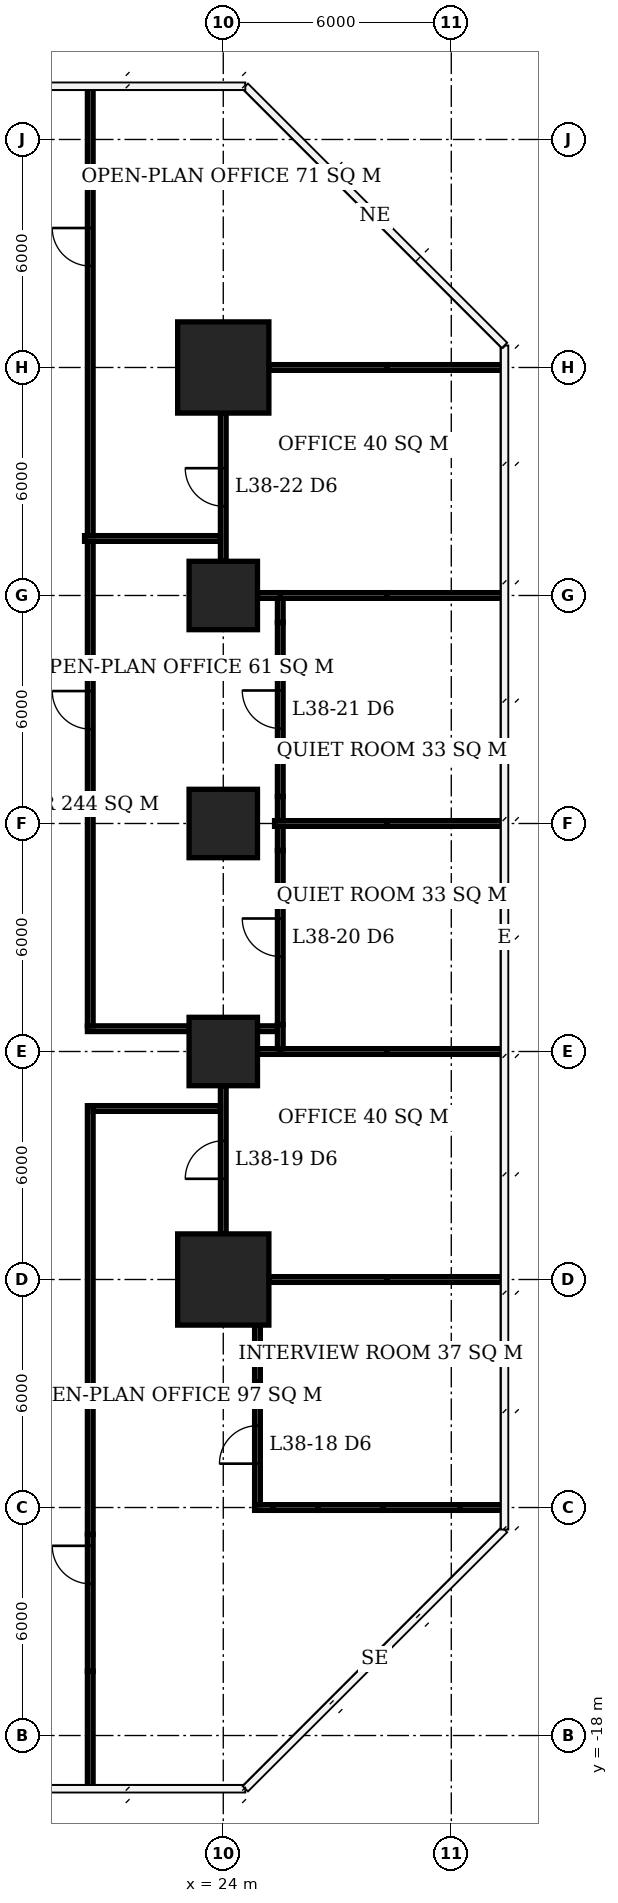
"""IFC4 building model, lengths in metres.
Left out: names, types, materials, properties, quantities, classifications, styles, units other than length and angle.
Written with IfcOpenShell. Run it as: python <this file> out.ifc"""

import sys

from ifc_helpers import new_model, si_unit, direction, frame, frame_2d, origin, origin_2d, place, context, subcontext, project, spatial, rectangle, extrude, element, fill, save


model = new_model("IFC4")
c1 = context("Model", 3, precision=1e-05, world=origin(), true_north=direction((0.0, 1.0)))
c2 = subcontext(c1, "Body", "Model", "MODEL_VIEW")
j1 = project(units=[si_unit("LENGTHUNIT", "METRE"), si_unit("PLANEANGLEUNIT", "RADIAN")], contexts=[c1])
p1 = place(None, origin())
s1 = spatial("IfcSite", under=j1, at=p1, CompositionType="ELEMENT")
p2 = place(p1, origin())
s2 = spatial("IfcBuilding", under=s1, at=p2, CompositionType="ELEMENT")
p3 = place(p2, frame((0.0, 0.0, 156.2)))
s3 = spatial("IfcBuildingStorey", under=s2, at=p3, CompositionType="ELEMENT", Elevation=156.2)
p4 = place(p3, frame((24.0, -6.0, 0.0), z_axis=(0.0, 0.0, 1.0), x_axis=(1.0, 0.0, 0.0)))
e1 = element("IfcColumn", 1, at=p4, inside=s3, PredefinedType="COLUMN", context=c2, shape_type="SweptSolid", body=[
    extrude(rectangle(XDim=2.4, YDim=2.4, at=origin_2d()), origin(), (0.0, 0.0, 1.0), 3.9),
])
for number, where, z_axis, x_axis in (
    (2, (24.0, 0.0, 0.0), (0.0, 0.0, 1.0), (1.0, 0.0, 0.0)),
    (3, (24.0, 6.0, 0.0), (0.0, 0.0, 1.0), (1.0, 0.0, 0.0)),
    (4, (24.0, 12.0, 0.0), (0.0, 0.0, 1.0), (1.0, 0.0, 0.0)),
):
    element("IfcColumn", number, at=place(p3, frame(where, z_axis=z_axis, x_axis=x_axis)), inside=s3, PredefinedType="COLUMN", context=c2, shape_type="SweptSolid", body=[
        extrude(rectangle(XDim=1.8, YDim=1.8, at=origin_2d()), origin(), (0.0, 0.0, 1.0), 3.9),
    ])
p5 = place(p3, frame((24.0, 18.0, 0.0), z_axis=(0.0, 0.0, 1.0), x_axis=(1.0, 0.0, 0.0)))
e5 = element("IfcColumn", 5, at=p5, inside=s3, PredefinedType="COLUMN", context=c2, shape_type="SweptSolid", body=[
    extrude(rectangle(XDim=2.4, YDim=2.4, at=origin_2d()), origin(), (0.0, 0.0, 1.0), 3.9),
])
p6 = place(p3, frame((24.825, -12.0, 0.0), z_axis=(0.0, 0.0, 1.0), x_axis=(1.0, 0.0, 0.0)))
e6 = element("IfcWall", 6, at=p6, inside=s3, PredefinedType="PARTITIONING", context=c2, shape_type="SweptSolid", body=[
    extrude(rectangle(XDim=0.485, YDim=0.15, at=frame_2d((0.243, 0.0))), origin(), (0.0, 0.0, 1.0), 3.65),
])
p7 = place(p3, frame((25.31, -12.0, 0.0), z_axis=(0.0, 0.0, 1.0), x_axis=(1.0, 0.0, 0.0)))
e7 = element("IfcWall", 7, at=p7, inside=s3, PredefinedType="PARTITIONING", context=c2, shape_type="SweptSolid", body=[
    extrude(rectangle(XDim=1.18, YDim=0.15, at=frame_2d((0.59, 0.0))), origin(), (0.0, 0.0, 1.0), 2.65),
])
p8 = place(p3, frame((26.49, -12.0, 0.0), z_axis=(0.0, 0.0, 1.0), x_axis=(1.0, 0.0, 0.0)))
e8 = element("IfcWall", 8, at=p8, inside=s3, PredefinedType="PARTITIONING", context=c2, shape_type="SweptSolid", body=[
    extrude(rectangle(XDim=1.718, YDim=0.15, at=frame_2d((0.859, 0.0))), origin(), (0.0, 0.0, 1.0), 3.65),
])
p9 = place(p3, frame((28.208, -12.0, 0.0), z_axis=(0.0, 0.0, 1.0), x_axis=(1.0, 0.0, 0.0)))
e9 = element("IfcWall", 9, at=p9, inside=s3, PredefinedType="PARTITIONING", context=c2, shape_type="SweptSolid", body=[
    extrude(rectangle(XDim=2.029, YDim=0.15, at=frame_2d((1.015, 0.0))), origin(), (0.0, 0.0, 1.0), 2.65),
])
p10 = place(p3, frame((30.237, -12.0, 0.0), z_axis=(0.0, 0.0, 1.0), x_axis=(1.0, 0.0, 0.0)))
e10 = element("IfcWall", 10, at=p10, inside=s3, PredefinedType="PARTITIONING", context=c2, shape_type="SweptSolid", body=[
    extrude(rectangle(XDim=1.163, YDim=0.15, at=frame_2d((0.582, 0.0))), origin(), (0.0, 0.0, 1.0), 3.65),
])
p11 = place(p3, frame((25.2, -6.0, 0.0), z_axis=(0.0, 0.0, 1.0), x_axis=(1.0, 0.0, 0.0)))
e11 = element("IfcWall", 11, at=p11, inside=s3, PredefinedType="PARTITIONING", context=c2, shape_type="SweptSolid", body=[
    extrude(rectangle(XDim=3.11, YDim=0.15, at=frame_2d((1.555, 0.0))), origin(), (0.0, 0.0, 1.0), 2.65),
])
p12 = place(p3, frame((28.31, -6.0, 0.0), z_axis=(0.0, 0.0, 1.0), x_axis=(1.0, 0.0, 0.0)))
e12 = element("IfcWall", 12, at=p12, inside=s3, PredefinedType="PARTITIONING", context=c2, shape_type="SweptSolid", body=[
    extrude(rectangle(XDim=3.09, YDim=0.15, at=frame_2d((1.545, 0.0))), origin(), (0.0, 0.0, 1.0), 3.65),
])
p13 = place(p3, frame((24.9, 0.0, 0.0), z_axis=(0.0, 0.0, 1.0), x_axis=(1.0, 0.0, 0.0)))
e13 = element("IfcWall", 13, at=p13, inside=s3, PredefinedType="PARTITIONING", context=c2, shape_type="SweptSolid", body=[
    extrude(rectangle(XDim=0.675, YDim=0.15, at=frame_2d((0.337, 0.0))), origin(), (0.0, 0.0, 1.0), 2.65),
])
p14 = place(p3, frame((25.5, 0.0, 0.0), z_axis=(0.0, 0.0, 1.0), x_axis=(1.0, 0.0, 0.0)))
e14 = element("IfcWall", 14, at=p14, inside=s3, PredefinedType="PARTITIONING", context=c2, shape_type="SweptSolid", body=[
    extrude(rectangle(XDim=2.81, YDim=0.15, at=frame_2d((1.405, 0.0))), origin(), (0.0, 0.0, 1.0), 2.65),
])
p15 = place(p3, frame((28.31, 0.0, 0.0), z_axis=(0.0, 0.0, 1.0), x_axis=(1.0, 0.0, 0.0)))
e15 = element("IfcWall", 15, at=p15, inside=s3, PredefinedType="PARTITIONING", context=c2, shape_type="SweptSolid", body=[
    extrude(rectangle(XDim=3.04, YDim=0.15, at=frame_2d((1.52, 0.0))), origin(), (0.0, 0.0, 1.0), 3.65),
])
p16 = place(p3, frame((25.35, 6.0, 0.0), z_axis=(0.0, 0.0, 1.0), x_axis=(1.0, 0.0, 0.0)))
e16 = element("IfcWall", 16, at=p16, inside=s3, PredefinedType="PARTITIONING", context=c2, shape_type="SweptSolid", body=[
    extrude(rectangle(XDim=2.96, YDim=0.15, at=frame_2d((1.48, 0.0))), origin(), (0.0, 0.0, 1.0), 2.65),
])
p17 = place(p3, frame((28.31, 6.0, 0.0), z_axis=(0.0, 0.0, 1.0), x_axis=(1.0, 0.0, 0.0)))
e17 = element("IfcWall", 17, at=p17, inside=s3, PredefinedType="PARTITIONING", context=c2, shape_type="SweptSolid", body=[
    extrude(rectangle(XDim=3.04, YDim=0.15, at=frame_2d((1.52, 0.0))), origin(), (0.0, 0.0, 1.0), 3.65),
])
p18 = place(p3, frame((24.9, 12.0, 0.0), z_axis=(0.0, 0.0, 1.0), x_axis=(1.0, 0.0, 0.0)))
e18 = element("IfcWall", 18, at=p18, inside=s3, PredefinedType="PARTITIONING", context=c2, shape_type="SweptSolid", body=[
    extrude(rectangle(XDim=0.675, YDim=0.15, at=frame_2d((0.337, 0.0))), origin(), (0.0, 0.0, 1.0), 2.65),
])
p19 = place(p3, frame((25.5, 12.0, 0.0), z_axis=(0.0, 0.0, 1.0), x_axis=(1.0, 0.0, 0.0)))
e19 = element("IfcWall", 19, at=p19, inside=s3, PredefinedType="PARTITIONING", context=c2, shape_type="SweptSolid", body=[
    extrude(rectangle(XDim=2.81, YDim=0.15, at=frame_2d((1.405, 0.0))), origin(), (0.0, 0.0, 1.0), 2.65),
])
p20 = place(p3, frame((28.31, 12.0, 0.0), z_axis=(0.0, 0.0, 1.0), x_axis=(1.0, 0.0, 0.0)))
e20 = element("IfcWall", 20, at=p20, inside=s3, PredefinedType="PARTITIONING", context=c2, shape_type="SweptSolid", body=[
    extrude(rectangle(XDim=3.09, YDim=0.15, at=frame_2d((1.545, 0.0))), origin(), (0.0, 0.0, 1.0), 3.65),
])
p21 = place(p3, frame((25.2, 18.0, 0.0), z_axis=(0.0, 0.0, 1.0), x_axis=(1.0, 0.0, 0.0)))
e21 = element("IfcWall", 21, at=p21, inside=s3, PredefinedType="PARTITIONING", context=c2, shape_type="SweptSolid", body=[
    extrude(rectangle(XDim=3.11, YDim=0.15, at=frame_2d((1.555, 0.0))), origin(), (0.0, 0.0, 1.0), 2.65),
])
p22 = place(p3, frame((28.31, 18.0, 0.0), z_axis=(0.0, 0.0, 1.0), x_axis=(1.0, 0.0, 0.0)))
e22 = element("IfcWall", 22, at=p22, inside=s3, PredefinedType="PARTITIONING", context=c2, shape_type="SweptSolid", body=[
    extrude(rectangle(XDim=3.09, YDim=0.15, at=frame_2d((1.545, 0.0))), origin(), (0.0, 0.0, 1.0), 3.65),
])
p23 = place(p3, frame((24.0, -4.8, 0.0), z_axis=(0.0, 0.0, 1.0), x_axis=(0.0, 1.0, 0.0)))
e23 = element("IfcWall", 23, at=p23, inside=s3, PredefinedType="PARTITIONING", context=c2, shape_type="SweptSolid", body=[
    extrude(rectangle(XDim=3.9, YDim=0.15, at=frame_2d((1.95, 0.0))), origin(), (0.0, 0.0, 1.0), 3.65),
])
p24 = place(p23, frame((1.45, 0.0, 0.0)))
e24 = element("IfcOpeningElement", 24, at=p24, cuts=e23, PredefinedType="OPENING", context=c2, shape_type="SweptSolid", body=[
    extrude(rectangle(XDim=1.0, YDim=2.1, at=frame_2d((0.5, 1.05))), frame((0.0, 0.085, 0.0), z_axis=(0.0, -1.0, 0.0), x_axis=(1.0, 0.0, 0.0)), (0.0, 0.0, 1.0), 0.17),
])
p25 = place(p3, frame((24.0, 12.9, 0.0), z_axis=(0.0, 0.0, 1.0), x_axis=(0.0, 1.0, 0.0)))
e25 = element("IfcWall", 25, at=p25, inside=s3, PredefinedType="PARTITIONING", context=c2, shape_type="SweptSolid", body=[
    extrude(rectangle(XDim=3.9, YDim=0.15, at=frame_2d((1.95, 0.0))), origin(), (0.0, 0.0, 1.0), 3.65),
])
p26 = place(p25, frame((1.45, 0.0, 0.0)))
e26 = element("IfcOpeningElement", 26, at=p26, cuts=e25, PredefinedType="OPENING", context=c2, shape_type="SweptSolid", body=[
    extrude(rectangle(XDim=1.0, YDim=2.1, at=frame_2d((0.5, 1.05))), frame((0.0, 0.085, 0.0), z_axis=(0.0, -1.0, 0.0), x_axis=(1.0, 0.0, 0.0)), (0.0, 0.0, 1.0), 0.17),
])
p27 = place(p3, frame((24.9, -11.925, 0.0), z_axis=(0.0, 0.0, 1.0), x_axis=(0.0, 1.0, 0.0)))
e27 = element("IfcWall", 27, at=p27, inside=s3, PredefinedType="PARTITIONING", context=c2, shape_type="SweptSolid", body=[
    extrude(rectangle(XDim=3.233, YDim=0.15, at=frame_2d((1.616, 0.0))), origin(), (0.0, 0.0, 1.0), 3.65),
])
p28 = place(p27, frame((1.079, 0.0, 0.0)))
e28 = element("IfcOpeningElement", 28, at=p28, cuts=e27, PredefinedType="OPENING", context=c2, shape_type="SweptSolid", body=[
    extrude(rectangle(XDim=1.0, YDim=2.1, at=frame_2d((0.5, 1.05))), frame((0.0, 0.085, 0.0), z_axis=(0.0, -1.0, 0.0), x_axis=(1.0, 0.0, 0.0)), (0.0, 0.0, 1.0), 0.17),
])
p29 = place(p3, frame((24.9, -8.692, 0.0), z_axis=(0.0, 0.0, 1.0), x_axis=(0.0, 1.0, 0.0)))
e29 = element("IfcWall", 29, at=p29, inside=s3, PredefinedType="PARTITIONING", context=c2, shape_type="SweptSolid", body=[
    extrude(rectangle(XDim=1.492, YDim=0.15, at=frame_2d((0.746, 0.0))), origin(), (0.0, 0.0, 1.0), 2.65),
])
p30 = place(p3, frame((25.5, 0.075, 0.0), z_axis=(0.0, 0.0, 1.0), x_axis=(0.0, 1.0, 0.0)))
e30 = element("IfcWall", 30, at=p30, inside=s3, PredefinedType="PARTITIONING", context=c2, shape_type="SweptSolid", body=[
    extrude(rectangle(XDim=0.635, YDim=0.15, at=frame_2d((0.317, 0.0))), origin(), (0.0, 0.0, 1.0), 2.65),
])
p31 = place(p3, frame((25.5, 0.71, 0.0), z_axis=(0.0, 0.0, 1.0), x_axis=(0.0, 1.0, 0.0)))
e31 = element("IfcWall", 31, at=p31, inside=s3, PredefinedType="PARTITIONING", context=c2, shape_type="SweptSolid", body=[
    extrude(rectangle(XDim=4.58, YDim=0.15, at=frame_2d((2.29, 0.0))), origin(), (0.0, 0.0, 1.0), 3.65),
])
p32 = place(p31, frame((1.79, 0.0, 0.0)))
e32 = element("IfcOpeningElement", 32, at=p32, cuts=e31, PredefinedType="OPENING", context=c2, shape_type="SweptSolid", body=[
    extrude(rectangle(XDim=1.0, YDim=2.1, at=frame_2d((0.5, 1.05))), frame((0.0, 0.085, 0.0), z_axis=(0.0, -1.0, 0.0), x_axis=(1.0, 0.0, 0.0)), (0.0, 0.0, 1.0), 0.17),
])
for number, where, z_axis, x_axis in (
    (33, (25.5, 5.29, 0.0), (0.0, 0.0, 1.0), (0.0, 1.0, 0.0)),
    (34, (25.5, 6.075, 0.0), (0.0, 0.0, 1.0), (0.0, 1.0, 0.0)),
):
    element("IfcWall", number, at=place(p3, frame(where, z_axis=z_axis, x_axis=x_axis)), inside=s3, PredefinedType="PARTITIONING", context=c2, shape_type="SweptSolid", body=[
        extrude(rectangle(XDim=0.635, YDim=0.15, at=frame_2d((0.317, 0.0))), origin(), (0.0, 0.0, 1.0), 2.65),
    ])
p33 = place(p3, frame((25.5, 6.71, 0.0), z_axis=(0.0, 0.0, 1.0), x_axis=(0.0, 1.0, 0.0)))
e35 = element("IfcWall", 35, at=p33, inside=s3, PredefinedType="PARTITIONING", context=c2, shape_type="SweptSolid", body=[
    extrude(rectangle(XDim=4.58, YDim=0.15, at=frame_2d((2.29, 0.0))), origin(), (0.0, 0.0, 1.0), 3.65),
])
p34 = place(p33, frame((1.79, 0.0, 0.0)))
e36 = element("IfcOpeningElement", 36, at=p34, cuts=e35, PredefinedType="OPENING", context=c2, shape_type="SweptSolid", body=[
    extrude(rectangle(XDim=1.0, YDim=2.1, at=frame_2d((0.5, 1.05))), frame((0.0, 0.085, 0.0), z_axis=(0.0, -1.0, 0.0), x_axis=(1.0, 0.0, 0.0)), (0.0, 0.0, 1.0), 0.17),
])
p35 = place(p3, frame((25.5, 11.29, 0.0), z_axis=(0.0, 0.0, 1.0), x_axis=(0.0, 1.0, 0.0)))
e37 = element("IfcWall", 37, at=p35, inside=s3, PredefinedType="PARTITIONING", context=c2, shape_type="SweptSolid", body=[
    extrude(rectangle(XDim=0.635, YDim=0.15, at=frame_2d((0.317, 0.0))), origin(), (0.0, 0.0, 1.0), 2.65),
])
p36 = place(p3, frame((20.5, -19.4, 0.0), z_axis=(0.0, 0.0, 1.0), x_axis=(0.0, 1.0, 0.0)))
e38 = element("IfcWall", 38, at=p36, inside=s3, PredefinedType="PARTITIONING", context=c2, shape_type="SweptSolid", body=[
    extrude(rectangle(XDim=3.09, YDim=0.15, at=frame_2d((1.545, 0.0))), origin(), (0.0, 0.0, 1.0), 3.65),
])
p37 = place(p3, frame((20.5, -16.31, 0.0), z_axis=(0.0, 0.0, 1.0), x_axis=(0.0, 1.0, 0.0)))
e39 = element("IfcWall", 39, at=p37, inside=s3, PredefinedType="PARTITIONING", context=c2, shape_type="SweptSolid", body=[
    extrude(rectangle(XDim=3.602, YDim=0.15, at=frame_2d((1.801, 0.0))), origin(), (0.0, 0.0, 1.0), 2.65),
])
p38 = place(p37, frame((2.302, 0.0, 0.0)))
e40 = element("IfcOpeningElement", 40, at=p38, cuts=e39, PredefinedType="OPENING", context=c2, shape_type="SweptSolid", body=[
    extrude(rectangle(XDim=1.0, YDim=2.1, at=frame_2d((0.5, 1.05))), frame((0.0, 0.085, 0.0), z_axis=(0.0, -1.0, 0.0), x_axis=(1.0, 0.0, 0.0)), (0.0, 0.0, 1.0), 0.17),
])
p39 = place(p3, frame((20.5, -12.708, 0.0), z_axis=(0.0, 0.0, 1.0), x_axis=(0.0, 1.0, 0.0)))
e41 = element("IfcWall", 41, at=p39, inside=s3, PredefinedType="PARTITIONING", context=c2, shape_type="SweptSolid", body=[
    extrude(rectangle(XDim=11.283, YDim=0.15, at=frame_2d((5.642, 0.0))), origin(), (0.0, 0.0, 1.0), 3.65),
])
p40 = place(p3, frame((20.575, -1.5, 0.0), z_axis=(0.0, 0.0, 1.0), x_axis=(1.0, 0.0, 0.0)))
e42 = element("IfcWall", 42, at=p40, inside=s3, PredefinedType="PARTITIONING", context=c2, shape_type="SweptSolid", body=[
    extrude(rectangle(XDim=3.35, YDim=0.15, at=frame_2d((1.675, 0.0))), origin(), (0.0, 0.0, 1.0), 3.65),
])
p41 = place(p3, frame((20.5, 0.675, 0.0), z_axis=(0.0, 0.0, 1.0), x_axis=(0.0, 1.0, 0.0)))
e43 = element("IfcWall", 43, at=p41, inside=s3, PredefinedType="PARTITIONING", context=c2, shape_type="SweptSolid", body=[
    extrude(rectangle(XDim=12.75, YDim=0.15, at=frame_2d((6.375, 0.0))), origin(), (0.0, 0.0, 1.0), 3.65),
])
p42 = place(p41, frame((7.81, 0.0, 0.0)))
e44 = element("IfcOpeningElement", 44, at=p42, cuts=e43, PredefinedType="OPENING", context=c2, shape_type="SweptSolid", body=[
    extrude(rectangle(XDim=1.0, YDim=2.1, at=frame_2d((0.5, 1.05))), frame((0.0, 0.085, 0.0), z_axis=(0.0, -1.0, 0.0), x_axis=(1.0, 0.0, 0.0)), (0.0, 0.0, 1.0), 0.17),
])
p43 = place(p3, frame((20.425, 0.6, 0.0), z_axis=(0.0, 0.0, 1.0), x_axis=(1.0, 0.0, 0.0)))
e45 = element("IfcWall", 45, at=p43, inside=s3, PredefinedType="PARTITIONING", context=c2, shape_type="SweptSolid", body=[
    extrude(rectangle(XDim=2.675, YDim=0.15, at=frame_2d((1.337, 0.0))), origin(), (0.0, 0.0, 1.0), 3.65),
])
p44 = place(p3, frame((24.9, 0.6, 0.0), z_axis=(0.0, 0.0, 1.0), x_axis=(1.0, 0.0, 0.0)))
e46 = element("IfcWall", 46, at=p44, inside=s3, PredefinedType="PARTITIONING", context=c2, shape_type="SweptSolid", body=[
    extrude(rectangle(XDim=0.525, YDim=0.15, at=frame_2d((0.263, 0.0))), origin(), (0.0, 0.0, 1.0), 2.65),
])
p45 = place(p3, frame((20.5, 13.575, 0.0), z_axis=(0.0, 0.0, 1.0), x_axis=(0.0, 1.0, 0.0)))
e47 = element("IfcWall", 47, at=p45, inside=s3, PredefinedType="PARTITIONING", context=c2, shape_type="SweptSolid", body=[
    extrude(rectangle(XDim=11.825, YDim=0.15, at=frame_2d((5.913, 0.0))), origin(), (0.0, 0.0, 1.0), 3.65),
])
p46 = place(p45, frame((7.095, 0.0, 0.0)))
e48 = element("IfcOpeningElement", 48, at=p46, cuts=e47, PredefinedType="OPENING", context=c2, shape_type="SweptSolid", body=[
    extrude(rectangle(XDim=1.0, YDim=2.1, at=frame_2d((0.5, 1.05))), frame((0.0, 0.085, 0.0), z_axis=(0.0, -1.0, 0.0), x_axis=(1.0, 0.0, 0.0)), (0.0, 0.0, 1.0), 0.17),
])
p47 = place(p3, frame((20.35, 13.5, 0.0), z_axis=(0.0, 0.0, 1.0), x_axis=(1.0, 0.0, 0.0)))
e49 = element("IfcWall", 49, at=p47, inside=s3, PredefinedType="PARTITIONING", context=c2, shape_type="SweptSolid", body=[
    extrude(rectangle(XDim=3.575, YDim=0.15, at=frame_2d((1.788, 0.0))), origin(), (0.0, 0.0, 1.0), 3.65),
])
p48 = place(p28, origin())
e50 = element("IfcDoor", 50, at=p48, inside=s3, OperationType="SINGLE_SWING_LEFT", PredefinedType="DOOR", context=c2, shape_type="SweptSolid", body=[
    extrude(rectangle(XDim=1.0, YDim=2.1, at=frame_2d((0.5, 1.05))), frame((0.0, 0.025, 0.0), z_axis=(0.0, -1.0, 0.0), x_axis=(1.0, 0.0, 0.0)), (0.0, 0.0, 1.0), 0.05),
])
fill(e28, e50)
p49 = place(p24, origin())
e51 = element("IfcDoor", 51, at=p49, inside=s3, OperationType="SINGLE_SWING_LEFT", PredefinedType="DOOR", context=c2, shape_type="SweptSolid", body=[
    extrude(rectangle(XDim=1.0, YDim=2.1, at=frame_2d((0.5, 1.05))), frame((0.0, 0.025, 0.0), z_axis=(0.0, -1.0, 0.0), x_axis=(1.0, 0.0, 0.0)), (0.0, 0.0, 1.0), 0.05),
])
fill(e24, e51)
p50 = place(p32, origin())
e52 = element("IfcDoor", 52, at=p50, inside=s3, OperationType="SINGLE_SWING_RIGHT", PredefinedType="DOOR", context=c2, shape_type="SweptSolid", body=[
    extrude(rectangle(XDim=1.0, YDim=2.1, at=frame_2d((0.5, 1.05))), frame((0.0, 0.025, 0.0), z_axis=(0.0, -1.0, 0.0), x_axis=(1.0, 0.0, 0.0)), (0.0, 0.0, 1.0), 0.05),
])
fill(e32, e52)
p51 = place(p34, origin())
e53 = element("IfcDoor", 53, at=p51, inside=s3, OperationType="SINGLE_SWING_RIGHT", PredefinedType="DOOR", context=c2, shape_type="SweptSolid", body=[
    extrude(rectangle(XDim=1.0, YDim=2.1, at=frame_2d((0.5, 1.05))), frame((0.0, 0.025, 0.0), z_axis=(0.0, -1.0, 0.0), x_axis=(1.0, 0.0, 0.0)), (0.0, 0.0, 1.0), 0.05),
])
fill(e36, e53)
p52 = place(p26, origin())
e54 = element("IfcDoor", 54, at=p52, inside=s3, OperationType="SINGLE_SWING_RIGHT", PredefinedType="DOOR", context=c2, shape_type="SweptSolid", body=[
    extrude(rectangle(XDim=1.0, YDim=2.1, at=frame_2d((0.5, 1.05))), frame((0.0, 0.025, 0.0), z_axis=(0.0, -1.0, 0.0), x_axis=(1.0, 0.0, 0.0)), (0.0, 0.0, 1.0), 0.05),
])
fill(e26, e54)
p53 = place(p38, origin())
e55 = element("IfcDoor", 55, at=p53, inside=s3, OperationType="SINGLE_SWING_RIGHT", PredefinedType="DOOR", context=c2, shape_type="SweptSolid", body=[
    extrude(rectangle(XDim=1.0, YDim=2.1, at=frame_2d((0.5, 1.05))), frame((0.0, 0.025, 0.0), z_axis=(0.0, -1.0, 0.0), x_axis=(1.0, 0.0, 0.0)), (0.0, 0.0, 1.0), 0.05),
])
fill(e40, e55)
p54 = place(p42, origin())
e56 = element("IfcDoor", 56, at=p54, inside=s3, OperationType="SINGLE_SWING_RIGHT", PredefinedType="DOOR", context=c2, shape_type="SweptSolid", body=[
    extrude(rectangle(XDim=1.0, YDim=2.1, at=frame_2d((0.5, 1.05))), frame((0.0, 0.025, 0.0), z_axis=(0.0, -1.0, 0.0), x_axis=(1.0, 0.0, 0.0)), (0.0, 0.0, 1.0), 0.05),
])
fill(e44, e56)
p55 = place(p46, origin())
e57 = element("IfcDoor", 57, at=p55, inside=s3, OperationType="SINGLE_SWING_RIGHT", PredefinedType="DOOR", context=c2, shape_type="SweptSolid", body=[
    extrude(rectangle(XDim=1.0, YDim=2.1, at=frame_2d((0.5, 1.05))), frame((0.0, 0.025, 0.0), z_axis=(0.0, -1.0, 0.0), x_axis=(1.0, 0.0, 0.0)), (0.0, 0.0, 1.0), 0.05),
])
fill(e48, e57)
save(model, sys.argv[1])
